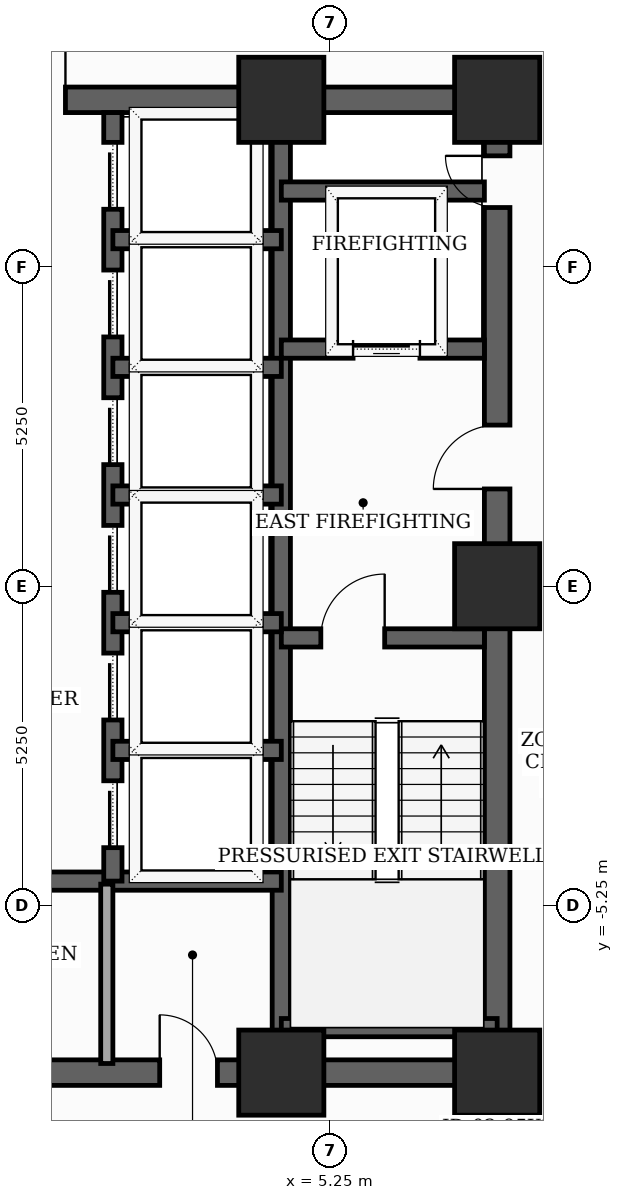
"""IFC4 building model, lengths in metres.
Left out: names, types, materials, properties, quantities, classifications, styles, units other than length and angle.
Written with IfcOpenShell. Run it as: python <this file> out.ifc"""

import sys

from ifc_helpers import new_model, si_unit, direction, frame, frame_2d, origin, origin_2d, place, context, subcontext, project, spatial, rectangle, extrude, element, fill, save


model = new_model("IFC4")
c1 = context("Model", 3, precision=1e-05, world=origin(), true_north=direction((0.0, 1.0)))
c2 = subcontext(c1, "Body", "Model", "MODEL_VIEW")
j1 = project(units=[si_unit("LENGTHUNIT", "METRE"), si_unit("PLANEANGLEUNIT", "RADIAN")], contexts=[c1])
p1 = place(None, origin())
s1 = spatial("IfcSite", under=j1, at=p1, CompositionType="ELEMENT")
p2 = place(p1, origin())
s2 = spatial("IfcBuilding", under=s1, at=p2, CompositionType="ELEMENT")
p3 = place(p2, frame((0.0, 0.0, 105.1)))
s3 = spatial("IfcBuildingStorey", under=s2, at=p3, CompositionType="ELEMENT", Elevation=105.1)
for number, where, z_axis, x_axis in (
    (1, (4.45, -8.0, 0.0), (0.0, 0.0, 1.0), (1.0, 0.0, 0.0)),
    (2, (8.0, -8.0, 0.0), (0.0, 0.0, 1.0), (1.0, 0.0, 0.0)),
    (3, (8.0, 0.0, 0.0), (0.0, 0.0, 1.0), (1.0, 0.0, 0.0)),
    (4, (8.0, 8.0, 0.0), (0.0, 0.0, 1.0), (1.0, 0.0, 0.0)),
    (5, (4.45, 8.0, 0.0), (0.0, 0.0, 1.0), (1.0, 0.0, 0.0)),
):
    element("IfcColumn", number, at=place(p3, frame(where, z_axis=z_axis, x_axis=x_axis)), inside=s3, PredefinedType="COLUMN", context=c2, shape_type="SweptSolid", body=[
        extrude(rectangle(XDim=1.4, YDim=1.4, at=origin_2d()), origin(), (0.0, 0.0, 1.0), 3.7),
    ])
p4 = place(p3, frame((8.0, -8.0, 0.0), z_axis=(0.0, 0.0, 1.0), x_axis=(0.0, 1.0, 0.0)))
e6 = element("IfcWall", 6, at=p4, inside=s3, PredefinedType="SHEAR", context=c2, shape_type="SweptSolid", body=[
    extrude(rectangle(XDim=16.0, YDim=0.42, at=frame_2d((8.0, 0.0))), origin(), (0.0, 0.0, 1.0), 3.5),
])
p5 = place(p4, frame((9.6, 0.0, 0.0)))
e7 = element("IfcOpeningElement", 7, at=p5, cuts=e6, PredefinedType="OPENING", context=c2, shape_type="SweptSolid", body=[
    extrude(rectangle(XDim=1.05, YDim=2.15, at=frame_2d((0.525, 1.075))), frame((0.0, 0.22, 0.0), z_axis=(0.0, -1.0, 0.0), x_axis=(1.0, 0.0, 0.0)), (0.0, 0.0, 1.0), 0.44),
])
p6 = place(p4, frame((14.229, 0.0, 0.0)))
e8 = element("IfcOpeningElement", 8, at=p6, cuts=e6, PredefinedType="OPENING", context=c2, shape_type="SweptSolid", body=[
    extrude(rectangle(XDim=0.85, YDim=2.02, at=frame_2d((0.425, 1.01))), frame((0.0, 0.22, 0.0), z_axis=(0.0, -1.0, 0.0), x_axis=(1.0, 0.0, 0.0)), (0.0, 0.0, 1.0), 0.44),
])
p7 = place(p3, frame((-8.0, -8.0, 0.0), z_axis=(0.0, 0.0, 1.0), x_axis=(1.0, 0.0, 0.0)))
e9 = element("IfcWall", 9, at=p7, inside=s3, PredefinedType="SHEAR", context=c2, shape_type="SweptSolid", body=[
    extrude(rectangle(XDim=16.0, YDim=0.42, at=frame_2d((8.0, 0.0))), origin(), (0.0, 0.0, 1.0), 3.5),
])
p8 = place(p7, frame((4.6, 0.0, 0.0)))
e10 = element("IfcOpeningElement", 10, at=p8, cuts=e9, PredefinedType="OPENING", context=c2, shape_type="SweptSolid", body=[
    extrude(rectangle(XDim=0.95, YDim=2.1, at=frame_2d((0.475, 1.05))), frame((0.0, 0.22, 0.0), z_axis=(0.0, -1.0, 0.0), x_axis=(1.0, 0.0, 0.0)), (0.0, 0.0, 1.0), 0.44),
])
p9 = place(p7, frame((7.52, 0.0, 0.0)))
e11 = element("IfcOpeningElement", 11, at=p9, cuts=e9, PredefinedType="OPENING", context=c2, shape_type="SweptSolid", body=[
    extrude(rectangle(XDim=0.95, YDim=2.1, at=frame_2d((0.475, 1.05))), frame((0.0, 0.22, 0.0), z_axis=(0.0, -1.0, 0.0), x_axis=(1.0, 0.0, 0.0)), (0.0, 0.0, 1.0), 0.44),
])
p10 = place(p7, frame((10.45, 0.0, 0.0)))
e12 = element("IfcOpeningElement", 12, at=p10, cuts=e9, PredefinedType="OPENING", context=c2, shape_type="SweptSolid", body=[
    extrude(rectangle(XDim=0.95, YDim=2.1, at=frame_2d((0.475, 1.05))), frame((0.0, 0.22, 0.0), z_axis=(0.0, -1.0, 0.0), x_axis=(1.0, 0.0, 0.0)), (0.0, 0.0, 1.0), 0.44),
])
p11 = place(p3, frame((-8.0, 8.0, 0.0), z_axis=(0.0, 0.0, 1.0), x_axis=(1.0, 0.0, 0.0)))
e13 = element("IfcWall", 13, at=p11, inside=s3, PredefinedType="SHEAR", context=c2, shape_type="SweptSolid", body=[
    extrude(rectangle(XDim=16.0, YDim=0.42, at=frame_2d((8.0, 0.0))), origin(), (0.0, 0.0, 1.0), 3.5),
])
p12 = place(p11, frame((7.1, 0.0, 0.0)))
e14 = element("IfcOpeningElement", 14, at=p12, cuts=e13, PredefinedType="OPENING", context=c2, shape_type="SweptSolid", body=[
    extrude(rectangle(XDim=1.8, YDim=2.15, at=frame_2d((0.9, 1.075))), frame((0.0, 0.22, 0.0), z_axis=(0.0, -1.0, 0.0), x_axis=(1.0, 0.0, 0.0)), (0.0, 0.0, 1.0), 0.44),
])
p13 = place(p3, frame((4.45, -7.79, 0.0), z_axis=(0.0, 0.0, 1.0), x_axis=(0.0, 1.0, 0.0)))
e15 = element("IfcWall", 15, at=p13, inside=s3, PredefinedType="SHEAR", context=c2, shape_type="SweptSolid", body=[
    extrude(rectangle(XDim=15.58, YDim=0.3, at=frame_2d((7.79, 0.0))), origin(), (0.0, 0.0, 1.0), 3.5),
])
p14 = place(p3, frame((4.45, -0.85, 0.0), z_axis=(0.0, 0.0, 1.0), x_axis=(1.0, 0.0, 0.0)))
e16 = element("IfcWall", 16, at=p14, inside=s3, PredefinedType="SHEAR", context=c2, shape_type="SweptSolid", body=[
    extrude(rectangle(XDim=3.34, YDim=0.3, at=frame_2d((1.67, 0.0))), origin(), (0.0, 0.0, 1.0), 3.5),
])
p15 = place(p14, frame((0.65, 0.0, 0.0)))
e17 = element("IfcOpeningElement", 17, at=p15, cuts=e16, PredefinedType="OPENING", context=c2, shape_type="SweptSolid", body=[
    extrude(rectangle(XDim=1.05, YDim=2.15, at=frame_2d((0.525, 1.075))), frame((0.0, 0.16, 0.0), z_axis=(0.0, -1.0, 0.0), x_axis=(1.0, 0.0, 0.0)), (0.0, 0.0, 1.0), 0.32),
])
p16 = place(p3, frame((4.45, -7.26, 0.0), z_axis=(0.0, 0.0, 1.0), x_axis=(1.0, 0.0, 0.0)))
e18 = element("IfcWall", 18, at=p16, inside=s3, PredefinedType="SHEAR", context=c2, shape_type="SweptSolid", body=[
    extrude(rectangle(XDim=3.55, YDim=0.3, at=frame_2d((1.775, 0.0))), origin(), (0.0, 0.0, 1.0), 3.5),
])
p17 = place(p3, frame((4.45, 3.9, 0.0), z_axis=(0.0, 0.0, 1.0), x_axis=(1.0, 0.0, 0.0)))
e19 = element("IfcWall", 19, at=p17, inside=s3, PredefinedType="SHEAR", context=c2, shape_type="SweptSolid", body=[
    extrude(rectangle(XDim=3.34, YDim=0.3, at=frame_2d((1.67, 0.0))), origin(), (0.0, 0.0, 1.0), 3.5),
])
p18 = place(p17, frame((1.18, 0.0, 0.0)))
e20 = element("IfcOpeningElement", 20, at=p18, cuts=e19, PredefinedType="OPENING", context=c2, shape_type="SweptSolid", body=[
    extrude(rectangle(XDim=1.1, YDim=2.1, at=frame_2d((0.55, 1.05))), frame((0.0, 0.16, 0.0), z_axis=(0.0, -1.0, 0.0), x_axis=(1.0, 0.0, 0.0)), (0.0, 0.0, 1.0), 0.32),
])
p19 = place(p3, frame((4.45, 6.5, 0.0), z_axis=(0.0, 0.0, 1.0), x_axis=(1.0, 0.0, 0.0)))
e21 = element("IfcWall", 21, at=p19, inside=s3, PredefinedType="SHEAR", context=c2, shape_type="SweptSolid", body=[
    extrude(rectangle(XDim=3.34, YDim=0.3, at=frame_2d((1.67, 0.0))), origin(), (0.0, 0.0, 1.0), 3.5),
])
p20 = place(p3, frame((-4.45, -4.85, 0.0), z_axis=(0.0, 0.0, 1.0), x_axis=(1.0, 0.0, 0.0)))
e22 = element("IfcWall", 22, at=p20, inside=s3, PredefinedType="SHEAR", context=c2, shape_type="SweptSolid", body=[
    extrude(rectangle(XDim=8.9, YDim=0.3, at=frame_2d((4.45, 0.0))), origin(), (0.0, 0.0, 1.0), 3.5),
])
p21 = place(p3, frame((1.68, -4.85, 0.0), z_axis=(0.0, 0.0, 1.0), x_axis=(0.0, 1.0, 0.0)))
e23 = element("IfcWall", 23, at=p21, inside=s3, PredefinedType="SHEAR", context=c2, shape_type="SweptSolid", body=[
    extrude(rectangle(XDim=12.64, YDim=0.3, at=frame_2d((6.32, 0.0))), origin(), (0.0, 0.0, 1.0), 3.5),
])
p22 = place(p21, frame((0.55, 0.0, 0.0)))
e24 = element("IfcOpeningElement", 24, at=p22, cuts=e23, PredefinedType="OPENING", context=c2, shape_type="SweptSolid", body=[
    extrude(rectangle(XDim=1.1, YDim=2.1, at=frame_2d((0.55, 1.05))), frame((0.0, 0.16, 0.0), z_axis=(0.0, -1.0, 0.0), x_axis=(1.0, 0.0, 0.0)), (0.0, 0.0, 1.0), 0.32),
])
p23 = place(p21, frame((2.65, 0.0, 0.0)))
e25 = element("IfcOpeningElement", 25, at=p23, cuts=e23, PredefinedType="OPENING", context=c2, shape_type="SweptSolid", body=[
    extrude(rectangle(XDim=1.1, YDim=2.1, at=frame_2d((0.55, 1.05))), frame((0.0, 0.16, 0.0), z_axis=(0.0, -1.0, 0.0), x_axis=(1.0, 0.0, 0.0)), (0.0, 0.0, 1.0), 0.32),
])
p24 = place(p21, frame((4.75, 0.0, 0.0)))
e26 = element("IfcOpeningElement", 26, at=p24, cuts=e23, PredefinedType="OPENING", context=c2, shape_type="SweptSolid", body=[
    extrude(rectangle(XDim=1.1, YDim=2.1, at=frame_2d((0.55, 1.05))), frame((0.0, 0.16, 0.0), z_axis=(0.0, -1.0, 0.0), x_axis=(1.0, 0.0, 0.0)), (0.0, 0.0, 1.0), 0.32),
])
p25 = place(p21, frame((6.85, 0.0, 0.0)))
e27 = element("IfcOpeningElement", 27, at=p25, cuts=e23, PredefinedType="OPENING", context=c2, shape_type="SweptSolid", body=[
    extrude(rectangle(XDim=1.1, YDim=2.1, at=frame_2d((0.55, 1.05))), frame((0.0, 0.16, 0.0), z_axis=(0.0, -1.0, 0.0), x_axis=(1.0, 0.0, 0.0)), (0.0, 0.0, 1.0), 0.32),
])
p26 = place(p21, frame((8.95, 0.0, 0.0)))
e28 = element("IfcOpeningElement", 28, at=p26, cuts=e23, PredefinedType="OPENING", context=c2, shape_type="SweptSolid", body=[
    extrude(rectangle(XDim=1.1, YDim=2.1, at=frame_2d((0.55, 1.05))), frame((0.0, 0.16, 0.0), z_axis=(0.0, -1.0, 0.0), x_axis=(1.0, 0.0, 0.0)), (0.0, 0.0, 1.0), 0.32),
])
p27 = place(p21, frame((11.05, 0.0, 0.0)))
e29 = element("IfcOpeningElement", 29, at=p27, cuts=e23, PredefinedType="OPENING", context=c2, shape_type="SweptSolid", body=[
    extrude(rectangle(XDim=1.1, YDim=2.1, at=frame_2d((0.55, 1.05))), frame((0.0, 0.16, 0.0), z_axis=(0.0, -1.0, 0.0), x_axis=(1.0, 0.0, 0.0)), (0.0, 0.0, 1.0), 0.32),
])
for number, where, z_axis, x_axis in (
    (30, (1.68, 1.5, 0.0), (0.0, 0.0, 1.0), (1.0, 0.0, 0.0)),
    (31, (1.68, 3.6, 0.0), (0.0, 0.0, 1.0), (1.0, 0.0, 0.0)),
    (32, (1.68, 5.7, 0.0), (0.0, 0.0, 1.0), (1.0, 0.0, 0.0)),
    (33, (1.68, -2.7, 0.0), (0.0, 0.0, 1.0), (1.0, 0.0, 0.0)),
    (34, (1.68, -0.6, 0.0), (0.0, 0.0, 1.0), (1.0, 0.0, 0.0)),
):
    element("IfcWall", number, at=place(p3, frame(where, z_axis=z_axis, x_axis=x_axis)), inside=s3, PredefinedType="SHEAR", context=c2, shape_type="SweptSolid", body=[
        extrude(rectangle(XDim=2.77, YDim=0.3, at=frame_2d((1.385, 0.0))), origin(), (0.0, 0.0, 1.0), 3.5),
    ])
p28 = place(p3, frame((1.58, -7.85, 0.0), z_axis=(0.0, 0.0, 1.0), x_axis=(0.0, 1.0, 0.0)))
e35 = element("IfcWall", 35, at=p28, inside=s3, PredefinedType="SOLIDWALL", context=c2, shape_type="SweptSolid", body=[
    extrude(rectangle(XDim=2.95, YDim=0.2, at=frame_2d((1.475, 0.0))), origin(), (0.0, 0.0, 1.0), 2.885),
])
p29 = place(p5, origin())
e36 = element("IfcDoor", 36, at=p29, inside=s3, OperationType="SINGLE_SWING_LEFT", PredefinedType="DOOR", context=c2, shape_type="SweptSolid", body=[
    extrude(rectangle(XDim=1.05, YDim=2.15, at=frame_2d((0.525, 1.075))), frame((0.0, 0.025, 0.0), z_axis=(0.0, -1.0, 0.0), x_axis=(1.0, 0.0, 0.0)), (0.0, 0.0, 1.0), 0.05),
])
fill(e7, e36)
p30 = place(p6, origin())
e37 = element("IfcDoor", 37, at=p30, inside=s3, OperationType="SINGLE_SWING_RIGHT", PredefinedType="TRAPDOOR", context=c2, shape_type="SweptSolid", body=[
    extrude(rectangle(XDim=0.85, YDim=2.02, at=frame_2d((0.425, 1.01))), frame((0.0, 0.025, 0.0), z_axis=(0.0, -1.0, 0.0), x_axis=(1.0, 0.0, 0.0)), (0.0, 0.0, 1.0), 0.05),
])
fill(e8, e37)
p31 = place(p10, origin())
e38 = element("IfcDoor", 38, at=p31, inside=s3, OperationType="SINGLE_SWING_LEFT", PredefinedType="DOOR", context=c2, shape_type="SweptSolid", body=[
    extrude(rectangle(XDim=0.95, YDim=2.1, at=frame_2d((0.475, 1.05))), frame((0.0, 0.025, 0.0), z_axis=(0.0, -1.0, 0.0), x_axis=(1.0, 0.0, 0.0)), (0.0, 0.0, 1.0), 0.05),
])
fill(e12, e38)
p32 = place(p12, origin())
e39 = element("IfcDoor", 39, at=p32, inside=s3, OperationType="DOUBLE_DOOR_SINGLE_SWING", PredefinedType="DOOR", context=c2, shape_type="SweptSolid", body=[
    extrude(rectangle(XDim=1.8, YDim=2.15, at=frame_2d((0.9, 1.075))), frame((0.0, 0.025, 0.0), z_axis=(0.0, -1.0, 0.0), x_axis=(1.0, 0.0, 0.0)), (0.0, 0.0, 1.0), 0.05),
])
fill(e14, e39)
p33 = place(p15, origin())
e40 = element("IfcDoor", 40, at=p33, inside=s3, OperationType="SINGLE_SWING_RIGHT", PredefinedType="DOOR", context=c2, shape_type="SweptSolid", body=[
    extrude(rectangle(XDim=1.05, YDim=2.15, at=frame_2d((0.525, 1.075))), frame((0.0, 0.025, 0.0), z_axis=(0.0, -1.0, 0.0), x_axis=(1.0, 0.0, 0.0)), (0.0, 0.0, 1.0), 0.05),
])
fill(e17, e40)
p34 = place(p18, origin())
e41 = element("IfcDoor", 41, at=p34, inside=s3, OperationType="SLIDING_TO_LEFT", PredefinedType="DOOR", context=c2, shape_type="SweptSolid", body=[
    extrude(rectangle(XDim=1.1, YDim=2.1, at=frame_2d((0.55, 1.05))), frame((0.0, 0.025, 0.0), z_axis=(0.0, -1.0, 0.0), x_axis=(1.0, 0.0, 0.0)), (0.0, 0.0, 1.0), 0.05),
])
fill(e20, e41)
p35 = place(p22, origin())
e42 = element("IfcDoor", 42, at=p35, inside=s3, OperationType="SLIDING_TO_LEFT", PredefinedType="DOOR", context=c2, shape_type="SweptSolid", body=[
    extrude(rectangle(XDim=1.1, YDim=2.1, at=frame_2d((0.55, 1.05))), frame((0.0, 0.025, 0.0), z_axis=(0.0, -1.0, 0.0), x_axis=(1.0, 0.0, 0.0)), (0.0, 0.0, 1.0), 0.05),
])
fill(e24, e42)
p36 = place(p23, origin())
e43 = element("IfcDoor", 43, at=p36, inside=s3, OperationType="SLIDING_TO_LEFT", PredefinedType="DOOR", context=c2, shape_type="SweptSolid", body=[
    extrude(rectangle(XDim=1.1, YDim=2.1, at=frame_2d((0.55, 1.05))), frame((0.0, 0.025, 0.0), z_axis=(0.0, -1.0, 0.0), x_axis=(1.0, 0.0, 0.0)), (0.0, 0.0, 1.0), 0.05),
])
fill(e25, e43)
p37 = place(p24, origin())
e44 = element("IfcDoor", 44, at=p37, inside=s3, OperationType="SLIDING_TO_LEFT", PredefinedType="DOOR", context=c2, shape_type="SweptSolid", body=[
    extrude(rectangle(XDim=1.1, YDim=2.1, at=frame_2d((0.55, 1.05))), frame((0.0, 0.025, 0.0), z_axis=(0.0, -1.0, 0.0), x_axis=(1.0, 0.0, 0.0)), (0.0, 0.0, 1.0), 0.05),
])
fill(e26, e44)
p38 = place(p25, origin())
e45 = element("IfcDoor", 45, at=p38, inside=s3, OperationType="SLIDING_TO_LEFT", PredefinedType="DOOR", context=c2, shape_type="SweptSolid", body=[
    extrude(rectangle(XDim=1.1, YDim=2.1, at=frame_2d((0.55, 1.05))), frame((0.0, 0.025, 0.0), z_axis=(0.0, -1.0, 0.0), x_axis=(1.0, 0.0, 0.0)), (0.0, 0.0, 1.0), 0.05),
])
fill(e27, e45)
p39 = place(p26, origin())
e46 = element("IfcDoor", 46, at=p39, inside=s3, OperationType="SLIDING_TO_LEFT", PredefinedType="DOOR", context=c2, shape_type="SweptSolid", body=[
    extrude(rectangle(XDim=1.1, YDim=2.1, at=frame_2d((0.55, 1.05))), frame((0.0, 0.025, 0.0), z_axis=(0.0, -1.0, 0.0), x_axis=(1.0, 0.0, 0.0)), (0.0, 0.0, 1.0), 0.05),
])
fill(e28, e46)
p40 = place(p27, origin())
e47 = element("IfcDoor", 47, at=p40, inside=s3, OperationType="SLIDING_TO_LEFT", PredefinedType="DOOR", context=c2, shape_type="SweptSolid", body=[
    extrude(rectangle(XDim=1.1, YDim=2.1, at=frame_2d((0.55, 1.05))), frame((0.0, 0.025, 0.0), z_axis=(0.0, -1.0, 0.0), x_axis=(1.0, 0.0, 0.0)), (0.0, 0.0, 1.0), 0.05),
])
fill(e29, e47)
save(model, sys.argv[1])
